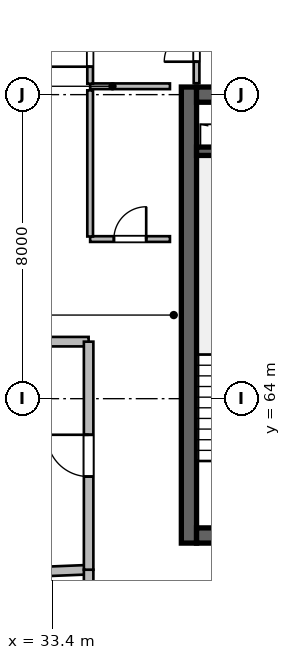
"""IFC4 building model, lengths in metres.
Left out: names, types, materials, properties, quantities, classifications, styles, units other than length and angle.
Written with IfcOpenShell. Run it as: python <this file> out.ifc"""

import sys

from ifc_helpers import new_model, si_unit, direction, frame, frame_2d, origin, place, context, subcontext, project, spatial, rectangle, extrude, source, transform, mapped, element, fill, save


model = new_model("IFC4")
c1 = context("Model", 3, precision=1e-05, world=origin(), true_north=direction((0.0, 1.0)))
c2 = subcontext(c1, "Body", "Model", "MODEL_VIEW")
j1 = project(units=[si_unit("LENGTHUNIT", "METRE"), si_unit("PLANEANGLEUNIT", "RADIAN")], contexts=[c1])
p1 = place(None, origin())
s1 = spatial("IfcSite", under=j1, at=p1, CompositionType="ELEMENT")
p2 = place(p1, origin())
s2 = spatial("IfcBuilding", under=s1, at=p2, CompositionType="ELEMENT")
p3 = place(p2, frame((0.0, 0.0, 299.1)))
s3 = spatial("IfcBuildingStorey", under=s2, at=p3, CompositionType="ELEMENT", Elevation=299.1)
m1 = source(origin(), c2, "Body", "SweptSolid", [
    extrude(rectangle(XDim=12.0, YDim=0.4, at=frame_2d((6.0, 0.0))), origin(), (0.0, 0.0, 1.0), 3.9),
])
p4 = place(p3, frame((37.0, 60.2, 0.0), z_axis=(0.0, 0.0, 1.0), x_axis=(0.0, 1.0, 0.0)))
e1 = element("IfcWall", 1, at=p4, inside=s3, PredefinedType="SHEAR", context=c2, shape_type="MappedRepresentation", body=[
    mapped(m1, transform((0.0, 0.0, 0.0), scale=1.0)),
])
m2 = source(origin(), c2, "Body", "SweptSolid", [
    extrude(rectangle(XDim=21.6, YDim=0.4, at=frame_2d((10.8, 0.0))), origin(), (0.0, 0.0, 1.0), 3.9),
])
p5 = place(p3, frame((37.2, 60.4, 0.0), z_axis=(0.0, 0.0, 1.0), x_axis=(1.0, 0.0, 0.0)))
e2 = element("IfcWall", 2, at=p5, inside=s3, PredefinedType="SHEAR", context=c2, shape_type="MappedRepresentation", body=[
    mapped(m2, transform((0.0, 0.0, 0.0), scale=1.0)),
])
p6 = place(p5, frame((1.1, 0.0, 0.0)))
e3 = element("IfcOpeningElement", 3, at=p6, cuts=e2, PredefinedType="OPENING", context=c2, shape_type="SweptSolid", body=[
    extrude(rectangle(XDim=1.15, YDim=2.15, at=frame_2d((0.575, 1.075))), frame((0.0, 0.21, 0.0), z_axis=(0.0, -1.0, 0.0), x_axis=(1.0, 0.0, 0.0)), (0.0, 0.0, 1.0), 0.42),
])
p7 = place(p5, frame((19.5, 0.0, 0.0)))
e4 = element("IfcOpeningElement", 4, at=p7, cuts=e2, PredefinedType="OPENING", context=c2, shape_type="SweptSolid", body=[
    extrude(rectangle(XDim=0.9, YDim=2.1, at=frame_2d((0.45, 1.05))), frame((0.0, 0.21, 0.0), z_axis=(0.0, -1.0, 0.0), x_axis=(1.0, 0.0, 0.0)), (0.0, 0.0, 1.0), 0.42),
])
p8 = place(p5, frame((12.02, 0.0, 0.0)))
e5 = element("IfcOpeningElement", 5, at=p8, cuts=e2, PredefinedType="OPENING", context=c2, shape_type="SweptSolid", body=[
    extrude(rectangle(XDim=1.6, YDim=2.15, at=frame_2d((0.8, 1.075))), frame((0.0, 0.21, 0.0), z_axis=(0.0, -1.0, 0.0), x_axis=(1.0, 0.0, 0.0)), (0.0, 0.0, 1.0), 0.42),
])
p9 = place(p3, frame((37.2, 72.0, 0.0), z_axis=(0.0, 0.0, 1.0), x_axis=(1.0, 0.0, 0.0)))
e6 = element("IfcWall", 6, at=p9, inside=s3, PredefinedType="SHEAR", context=c2, shape_type="MappedRepresentation", body=[
    mapped(m2, transform((0.0, 0.0, 0.0), scale=1.0)),
])
p10 = place(p9, frame((1.2, 0.0, 0.0)))
e7 = element("IfcOpeningElement", 7, at=p10, cuts=e6, PredefinedType="OPENING", context=c2, shape_type="SweptSolid", body=[
    extrude(rectangle(XDim=0.9, YDim=2.1, at=frame_2d((0.45, 1.05))), frame((0.0, 0.21, 0.0), z_axis=(0.0, -1.0, 0.0), x_axis=(1.0, 0.0, 0.0)), (0.0, 0.0, 1.0), 0.42),
])
p11 = place(p9, frame((14.7, 0.0, 0.0)))
e8 = element("IfcOpeningElement", 8, at=p11, cuts=e6, PredefinedType="OPENING", context=c2, shape_type="SweptSolid", body=[
    extrude(rectangle(XDim=1.2, YDim=2.15, at=frame_2d((0.6, 1.075))), frame((0.0, 0.21, 0.0), z_axis=(0.0, -1.0, 0.0), x_axis=(1.0, 0.0, 0.0)), (0.0, 0.0, 1.0), 0.42),
])
p12 = place(p9, frame((4.15, 0.0, 0.0)))
e9 = element("IfcOpeningElement", 9, at=p12, cuts=e6, PredefinedType="OPENING", context=c2, shape_type="SweptSolid", body=[
    extrude(rectangle(XDim=1.3, YDim=2.15, at=frame_2d((0.65, 1.075))), frame((0.0, 0.21, 0.0), z_axis=(0.0, -1.0, 0.0), x_axis=(1.0, 0.0, 0.0)), (0.0, 0.0, 1.0), 0.42),
])
p13 = place(p9, frame((7.25, 0.0, 0.0)))
e10 = element("IfcOpeningElement", 10, at=p13, cuts=e6, PredefinedType="OPENING", context=c2, shape_type="SweptSolid", body=[
    extrude(rectangle(XDim=0.9, YDim=2.1, at=frame_2d((0.45, 1.05))), frame((0.0, 0.21, 0.0), z_axis=(0.0, -1.0, 0.0), x_axis=(1.0, 0.0, 0.0)), (0.0, 0.0, 1.0), 0.42),
])
p14 = place(p9, frame((10.95, 0.0, 0.0)))
e11 = element("IfcOpeningElement", 11, at=p14, cuts=e6, PredefinedType="OPENING", context=c2, shape_type="SweptSolid", body=[
    extrude(rectangle(XDim=0.9, YDim=2.1, at=frame_2d((0.45, 1.05))), frame((0.0, 0.21, 0.0), z_axis=(0.0, -1.0, 0.0), x_axis=(1.0, 0.0, 0.0)), (0.0, 0.0, 1.0), 0.42),
])
m3 = source(origin(), c2, "Body", "SweptSolid", [
    extrude(rectangle(XDim=3.27, YDim=0.22, at=frame_2d((1.635, 0.0))), origin(), (0.0, 0.0, 1.0), 3.9),
])
p15 = place(p3, frame((37.2, 70.51, 0.0), z_axis=(0.0, 0.0, 1.0), x_axis=(1.0, 0.0, 0.0)))
e12 = element("IfcWall", 12, at=p15, inside=s3, PredefinedType="SHEAR", context=c2, shape_type="MappedRepresentation", body=[
    mapped(m3, transform((0.0, 0.0, 0.0), scale=1.0)),
])
m4 = source(origin(), c2, "Body", "SweptSolid", [
    extrude(rectangle(XDim=2.1, YDim=0.15, at=frame_2d((1.05, 0.0))), origin(), (0.0, 0.0, 1.0), 3.64),
])
p16 = place(p3, frame((34.4, 72.22, 0.0), z_axis=(0.0, 0.0, 1.0), x_axis=(1.0, 0.0, 0.0)))
e13 = element("IfcWall", 13, at=p16, inside=s3, PredefinedType="PARTITIONING", context=c2, shape_type="MappedRepresentation", body=[
    mapped(m4, transform((0.0, 0.0, 0.0), scale=1.0)),
])
m5 = source(origin(), c2, "Body", "SweptSolid", [
    extrude(rectangle(XDim=1.995, YDim=0.15, at=frame_2d((0.998, 0.0))), origin(), (0.0, 0.0, 1.0), 3.64),
])
p17 = place(p3, frame((34.4, 72.288, 0.0), z_axis=(0.0, 0.0, 1.0), x_axis=(0.0, 1.0, 0.0)))
e14 = element("IfcWall", 14, at=p17, inside=s3, PredefinedType="PARTITIONING", context=c2, shape_type="MappedRepresentation", body=[
    mapped(m5, transform((0.0, 0.0, 0.0), scale=1.0)),
])
p18 = place(p17, frame((0.448, 0.0, 0.0)))
e15 = element("IfcOpeningElement", 15, at=p18, cuts=e14, PredefinedType="OPENING", context=c2, shape_type="SweptSolid", body=[
    extrude(rectangle(XDim=1.1, YDim=2.15, at=frame_2d((0.55, 1.075))), frame((0.0, 0.085, 0.0), z_axis=(0.0, -1.0, 0.0), x_axis=(1.0, 0.0, 0.0)), (0.0, 0.0, 1.0), 0.17),
])
m6 = source(origin(), c2, "Body", "SweptSolid", [
    extrude(rectangle(XDim=1.982, YDim=0.15, at=frame_2d((0.991, 0.0))), origin(), (0.0, 0.0, 1.0), 3.64),
])
p19 = place(p3, frame((37.2, 72.3, 0.0), z_axis=(0.0, 0.0, 1.0), x_axis=(0.0, 1.0, 0.0)))
e16 = element("IfcWall", 16, at=p19, inside=s3, PredefinedType="PARTITIONING", context=c2, shape_type="MappedRepresentation", body=[
    mapped(m6, transform((0.0, 0.0, 0.0), scale=1.0)),
])
p20 = place(p19, frame((0.566, 0.0, 0.0)))
e17 = element("IfcOpeningElement", 17, at=p20, cuts=e16, PredefinedType="OPENING", context=c2, shape_type="SweptSolid", body=[
    extrude(rectangle(XDim=0.85, YDim=2.1, at=frame_2d((0.425, 1.05))), frame((0.0, 0.085, 0.0), z_axis=(0.0, -1.0, 0.0), x_axis=(1.0, 0.0, 0.0)), (0.0, 0.0, 1.0), 0.17),
])
p21 = place(p3, frame((34.4, 68.2, 0.0), z_axis=(0.0, 0.0, 1.0), x_axis=(1.0, 0.0, 0.0)))
e18 = element("IfcWall", 18, at=p21, inside=s3, PredefinedType="PARTITIONING", context=c2, shape_type="MappedRepresentation", body=[
    mapped(m4, transform((0.0, 0.0, 0.0), scale=1.0)),
])
p22 = place(p21, frame((0.625, 0.0, 0.0)))
e19 = element("IfcOpeningElement", 19, at=p22, cuts=e18, PredefinedType="OPENING", context=c2, shape_type="SweptSolid", body=[
    extrude(rectangle(XDim=0.85, YDim=2.1, at=frame_2d((0.425, 1.05))), frame((0.0, 0.085, 0.0), z_axis=(0.0, -1.0, 0.0), x_axis=(1.0, 0.0, 0.0)), (0.0, 0.0, 1.0), 0.17),
])
m7 = source(origin(), c2, "Body", "SweptSolid", [
    extrude(rectangle(XDim=3.845, YDim=0.15, at=frame_2d((1.922, 0.0))), origin(), (0.0, 0.0, 1.0), 3.64),
])
p23 = place(p3, frame((34.4, 68.268, 0.0), z_axis=(0.0, 0.0, 1.0), x_axis=(0.0, 1.0, 0.0)))
e20 = element("IfcWall", 20, at=p23, inside=s3, PredefinedType="PARTITIONING", context=c2, shape_type="MappedRepresentation", body=[
    mapped(m7, transform((0.0, 0.0, 0.0), scale=1.0)),
])
m8 = source(origin(), c2, "Body", "SweptSolid", [
    extrude(rectangle(XDim=13.499, YDim=0.25, at=frame_2d((6.75, 0.0))), origin(), (0.0, 0.0, 1.0), 3.64),
])
p24 = place(p3, frame((20.872, 58.951, 0.0), z_axis=(0.0, 0.0, 1.0), x_axis=(0.999172424054, 0.04067513995, 0.0)))
e21 = element("IfcWall", 21, at=p24, inside=s3, PredefinedType="PARTITIONING", context=c2, shape_type="MappedRepresentation", body=[
    mapped(m8, transform((0.0, 0.0, 0.0), scale=1.0)),
])
m9 = source(origin(), c2, "Body", "SweptSolid", [
    extrude(rectangle(XDim=1.54, YDim=0.25, at=frame_2d((0.77, 0.0))), origin(), (0.0, 0.0, 1.0), 3.64),
])
p25 = place(p3, frame((34.36, 57.96, 0.0), z_axis=(0.0, 0.0, 1.0), x_axis=(0.0, 1.0, 0.0)))
e22 = element("IfcWall", 22, at=p25, inside=s3, PredefinedType="PARTITIONING", context=c2, shape_type="MappedRepresentation", body=[
    mapped(m9, transform((0.0, 0.0, 0.0), scale=1.0)),
])
m10 = source(origin(), c2, "Body", "SweptSolid", [
    extrude(rectangle(XDim=12.517, YDim=0.25, at=frame_2d((6.258, 0.0))), origin(), (0.0, 0.0, 1.0), 3.64),
])
p26 = place(p3, frame((21.844, 65.5, 0.0), z_axis=(0.0, 0.0, 1.0), x_axis=(1.0, 0.0, 0.0)))
e23 = element("IfcWall", 23, at=p26, inside=s3, PredefinedType="PARTITIONING", context=c2, shape_type="MappedRepresentation", body=[
    mapped(m10, transform((0.0, 0.0, 0.0), scale=1.0)),
])
m11 = source(origin(), c2, "Body", "SweptSolid", [
    extrude(rectangle(XDim=6.0, YDim=0.25, at=frame_2d((3.0, 0.0))), origin(), (0.0, 0.0, 1.0), 3.64),
])
p27 = place(p3, frame((34.36, 59.5, 0.0), z_axis=(0.0, 0.0, 1.0), x_axis=(0.0, 1.0, 0.0)))
e24 = element("IfcWall", 24, at=p27, inside=s3, PredefinedType="PARTITIONING", context=c2, shape_type="MappedRepresentation", body=[
    mapped(m11, transform((0.0, 0.0, 0.0), scale=1.0)),
])
p28 = place(p27, frame((2.45, 0.0, 0.0)))
e25 = element("IfcOpeningElement", 25, at=p28, cuts=e24, PredefinedType="OPENING", context=c2, shape_type="SweptSolid", body=[
    extrude(rectangle(XDim=1.1, YDim=2.15, at=frame_2d((0.55, 1.075))), frame((0.0, 0.135, 0.0), z_axis=(0.0, -1.0, 0.0), x_axis=(1.0, 0.0, 0.0)), (0.0, 0.0, 1.0), 0.27),
])
m12 = source(origin(), c2, "Body", "SweptSolid", [
    extrude(rectangle(XDim=0.85, YDim=2.1, at=frame_2d((0.425, 1.05))), frame((0.0, 0.025, 0.0), z_axis=(0.0, -1.0, 0.0), x_axis=(1.0, 0.0, 0.0)), (0.0, 0.0, 1.0), 0.05),
])
p29 = place(p20, origin())
e26 = element("IfcDoor", 26, at=p29, inside=s3, OperationType="SINGLE_SWING_LEFT", PredefinedType="DOOR", context=c2, shape_type="MappedRepresentation", body=[
    mapped(m12, transform((0.0, 0.0, 0.0), scale=1.0)),
])
fill(e17, e26)
p30 = place(p22, origin())
e27 = element("IfcDoor", 27, at=p30, inside=s3, OperationType="SINGLE_SWING_RIGHT", PredefinedType="DOOR", context=c2, shape_type="MappedRepresentation", body=[
    mapped(m12, transform((0.0, 0.0, 0.0), scale=1.0)),
])
fill(e19, e27)
m13 = source(origin(), c2, "Body", "SweptSolid", [
    extrude(rectangle(XDim=1.1, YDim=2.15, at=frame_2d((0.55, 1.075))), frame((0.0, 0.025, 0.0), z_axis=(0.0, -1.0, 0.0), x_axis=(1.0, 0.0, 0.0)), (0.0, 0.0, 1.0), 0.05),
])
p31 = place(p28, origin())
e28 = element("IfcDoor", 28, at=p31, inside=s3, OperationType="SINGLE_SWING_RIGHT", PredefinedType="DOOR", context=c2, shape_type="MappedRepresentation", body=[
    mapped(m13, transform((0.0, 0.0, 0.0), scale=1.0)),
])
fill(e25, e28)
p32 = place(p18, origin())
e29 = element("IfcDoor", 29, at=p32, inside=s3, OperationType="SINGLE_SWING_LEFT", PredefinedType="DOOR", context=c2, shape_type="MappedRepresentation", body=[
    mapped(m13, transform((0.0, 0.0, 0.0), scale=1.0)),
])
fill(e15, e29)
save(model, sys.argv[1])
